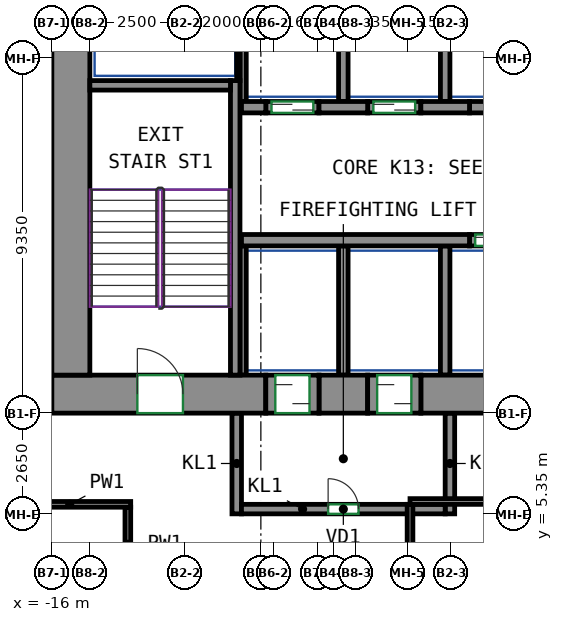
"""IFC4 building model, lengths in metres.
Left out: names, types, materials, properties, quantities, classifications, styles, units other than length and angle.
Written with IfcOpenShell. Run it as: python <this file> out.ifc"""

import sys

from ifc_helpers import new_model, si_unit, direction, frame, frame_2d, origin, place, context, subcontext, project, spatial, rectangle, extrude, source, transform, mapped, element, fill, save


model = new_model("IFC4")
c1 = context("Model", 3, precision=1e-05, world=origin(), true_north=direction((0.0, 1.0)))
c2 = subcontext(c1, "Body", "Model", "MODEL_VIEW")
j1 = project(units=[si_unit("LENGTHUNIT", "METRE"), si_unit("PLANEANGLEUNIT", "RADIAN")], contexts=[c1])
p1 = place(None, origin())
s1 = spatial("IfcSite", under=j1, at=p1, CompositionType="ELEMENT")
p2 = place(p1, origin())
s2 = spatial("IfcBuilding", under=s1, at=p2, CompositionType="ELEMENT")
p3 = place(p2, frame((0.0, 0.0, 55.0)))
s3 = spatial("IfcBuildingStorey", under=s2, at=p3, CompositionType="ELEMENT", Elevation=55.0)
m1 = source(origin(), c2, "Body", "SweptSolid", [
    extrude(rectangle(XDim=5.63, YDim=1.0, at=frame_2d((2.815, 0.0))), origin(), (0.0, 0.0, 1.0), 3.6),
])
p4 = place(p3, frame((-16.0, 8.5, 0.0), z_axis=(0.0, 0.0, 1.0), x_axis=(1.0, 0.0, 0.0)))
e1 = element("IfcWall", 1, at=p4, inside=s3, PredefinedType="SHEAR", context=c2, shape_type="MappedRepresentation", body=[
    mapped(m1, transform((0.0, 0.0, 0.0))),
])
p5 = place(p4, frame((2.25, 0.0, 0.0)))
e2 = element("IfcOpeningElement", 2, at=p5, cuts=e1, PredefinedType="OPENING", context=c2, shape_type="SweptSolid", body=[
    extrude(rectangle(XDim=1.2, YDim=2.1, at=frame_2d((0.6, 1.05))), frame((0.0, 0.51, 0.0), z_axis=(0.0, -1.0, 0.0), x_axis=(1.0, 0.0, 0.0)), (0.0, 0.0, 1.0), 1.02),
])
m2 = source(origin(), c2, "Body", "SweptSolid", [
    extrude(rectangle(XDim=1.28, YDim=1.0, at=frame_2d((0.64, 0.0))), origin(), (0.0, 0.0, 1.0), 3.6),
])
p6 = place(p3, frame((-8.97, 8.5, 0.0), z_axis=(0.0, 0.0, 1.0), x_axis=(1.0, 0.0, 0.0)))
e3 = element("IfcWall", 3, at=p6, inside=s3, PredefinedType="SHEAR", context=c2, shape_type="MappedRepresentation", body=[
    mapped(m2, transform((0.0, 0.0, 0.0))),
])
m3 = source(origin(), c2, "Body", "SweptSolid", [
    extrude(rectangle(XDim=14.18, YDim=1.0, at=frame_2d((7.09, 0.0))), origin(), (0.0, 0.0, 1.0), 3.6),
])
p7 = place(p3, frame((-6.29, 8.5, 0.0), z_axis=(0.0, 0.0, 1.0), x_axis=(1.0, 0.0, 0.0)))
e4 = element("IfcWall", 4, at=p7, inside=s3, PredefinedType="SHEAR", context=c2, shape_type="MappedRepresentation", body=[
    mapped(m3, transform((0.0, 0.0, 0.0))),
])
m4 = source(origin(), c2, "Body", "SweptSolid", [
    extrude(rectangle(XDim=12.0, YDim=1.0, at=frame_2d((6.0, 0.0))), origin(), (0.0, 0.0, 1.0), 3.6),
])
p8 = place(p3, frame((-15.5, 9.0, 0.0), z_axis=(0.0, 0.0, 1.0), x_axis=(0.0, 1.0, 0.0)))
e5 = element("IfcWall", 5, at=p8, inside=s3, PredefinedType="SHEAR", context=c2, shape_type="MappedRepresentation", body=[
    mapped(m4, transform((0.0, 0.0, 0.0))),
])
m5 = source(origin(), c2, "Body", "SweptSolid", [
    extrude(rectangle(XDim=7.75, YDim=0.25, at=frame_2d((3.875, 0.0))), origin(), (0.0, 0.0, 1.0), 3.6),
])
p9 = place(p3, frame((-11.175, 9.0, 0.0), z_axis=(0.0, 0.0, 1.0), x_axis=(0.0, 1.0, 0.0)))
e6 = element("IfcWall", 6, at=p9, inside=s3, PredefinedType="SHEAR", context=c2, shape_type="MappedRepresentation", body=[
    mapped(m5, transform((0.0, 0.0, 0.0))),
])
m6 = source(origin(), c2, "Body", "SweptSolid", [
    extrude(rectangle(XDim=3.7, YDim=0.25, at=frame_2d((1.85, 0.0))), origin(), (0.0, 0.0, 1.0), 3.6),
])
p10 = place(p3, frame((-15.0, 16.625, 0.0), z_axis=(0.0, 0.0, 1.0), x_axis=(1.0, 0.0, 0.0)))
e7 = element("IfcWall", 7, at=p10, inside=s3, PredefinedType="SHEAR", context=c2, shape_type="MappedRepresentation", body=[
    mapped(m6, transform((0.0, 0.0, 0.0))),
])
m7 = source(origin(), c2, "Body", "SweptSolid", [
    extrude(rectangle(XDim=6.0, YDim=0.3, at=frame_2d((3.0, 0.0))), origin(), (0.0, 0.0, 1.0), 3.6),
])
p11 = place(p3, frame((-11.01, 12.55, 0.0), z_axis=(0.0, 0.0, 1.0), x_axis=(1.0, 0.0, 0.0)))
e8 = element("IfcWall", 8, at=p11, inside=s3, PredefinedType="SHEAR", context=c2, shape_type="MappedRepresentation", body=[
    mapped(m7, transform((0.0, 0.0, 0.0))),
])
m8 = source(origin(), c2, "Body", "SweptSolid", [
    extrude(rectangle(XDim=0.64, YDim=0.3, at=frame_2d((0.32, 0.0))), origin(), (0.0, 0.0, 1.0), 3.6),
])
p12 = place(p3, frame((-11.01, 16.05, 0.0), z_axis=(0.0, 0.0, 1.0), x_axis=(1.0, 0.0, 0.0)))
e9 = element("IfcWall", 9, at=p12, inside=s3, PredefinedType="SHEAR", context=c2, shape_type="MappedRepresentation", body=[
    mapped(m8, transform((0.0, 0.0, 0.0))),
])
m9 = source(origin(), c2, "Body", "SweptSolid", [
    extrude(rectangle(XDim=1.28, YDim=0.3, at=frame_2d((0.64, 0.0))), origin(), (0.0, 0.0, 1.0), 3.6),
])
for number, where, z_axis, x_axis in (
    (10, (-8.97, 16.05, 0.0), (0.0, 0.0, 1.0), (1.0, 0.0, 0.0)),
    (11, (-6.29, 16.05, 0.0), (0.0, 0.0, 1.0), (1.0, 0.0, 0.0)),
):
    element("IfcWall", number, at=place(p3, frame(where, z_axis=z_axis, x_axis=x_axis)), inside=s3, PredefinedType="SHEAR", context=c2, shape_type="MappedRepresentation", body=[
        mapped(m9, transform((0.0, 0.0, 0.0))),
    ])
m10 = source(origin(), c2, "Body", "SweptSolid", [
    extrude(rectangle(XDim=1.4, YDim=0.3, at=frame_2d((0.7, 0.0))), origin(), (0.0, 0.0, 1.0), 3.6),
])
p13 = place(p3, frame((-5.01, 12.55, 0.0), z_axis=(0.0, 0.0, 1.0), x_axis=(1.0, 0.0, 0.0)))
e12 = element("IfcWall", 12, at=p13, inside=s3, PredefinedType="PARTITIONING", context=c2, shape_type="MappedRepresentation", body=[
    mapped(m10, transform((0.0, 0.0, 0.0))),
])
p14 = place(p13, frame((0.15, 0.0, 0.0)))
e13 = element("IfcOpeningElement", 13, at=p14, cuts=e12, PredefinedType="OPENING", context=c2, shape_type="SweptSolid", body=[
    extrude(rectangle(XDim=1.1, YDim=2.1, at=frame_2d((0.55, 1.05))), frame((0.0, 0.16, 0.0), z_axis=(0.0, -1.0, 0.0), x_axis=(1.0, 0.0, 0.0)), (0.0, 0.0, 1.0), 0.32),
])
m11 = source(origin(), c2, "Body", "SweptSolid", [
    extrude(rectangle(XDim=1.4, YDim=0.3, at=frame_2d((0.7, 0.0))), origin(), (0.0, 0.0, 1.0), 3.6),
])
p15 = place(p3, frame((-10.37, 16.05, 0.0), z_axis=(0.0, 0.0, 1.0), x_axis=(1.0, 0.0, 0.0)))
e14 = element("IfcWall", 14, at=p15, inside=s3, PredefinedType="PARTITIONING", context=c2, shape_type="MappedRepresentation", body=[
    mapped(m11, transform((0.0, 0.0, 0.0))),
])
p16 = place(p15, frame((0.15, 0.0, 0.0)))
e15 = element("IfcOpeningElement", 15, at=p16, cuts=e14, PredefinedType="OPENING", context=c2, shape_type="SweptSolid", body=[
    extrude(rectangle(XDim=1.1, YDim=2.1, at=frame_2d((0.55, 1.05))), frame((0.0, 0.16, 0.0), z_axis=(0.0, -1.0, 0.0), x_axis=(1.0, 0.0, 0.0)), (0.0, 0.0, 1.0), 0.32),
])
p17 = place(p3, frame((-7.69, 16.05, 0.0), z_axis=(0.0, 0.0, 1.0), x_axis=(1.0, 0.0, 0.0)))
e16 = element("IfcWall", 16, at=p17, inside=s3, PredefinedType="PARTITIONING", context=c2, shape_type="MappedRepresentation", body=[
    mapped(m10, transform((0.0, 0.0, 0.0))),
])
p18 = place(p17, frame((0.15, 0.0, 0.0)))
e17 = element("IfcOpeningElement", 17, at=p18, cuts=e16, PredefinedType="OPENING", context=c2, shape_type="SweptSolid", body=[
    extrude(rectangle(XDim=1.1, YDim=2.1, at=frame_2d((0.55, 1.05))), frame((0.0, 0.16, 0.0), z_axis=(0.0, -1.0, 0.0), x_axis=(1.0, 0.0, 0.0)), (0.0, 0.0, 1.0), 0.32),
])
p19 = place(p3, frame((-5.01, 16.05, 0.0), z_axis=(0.0, 0.0, 1.0), x_axis=(1.0, 0.0, 0.0)))
e18 = element("IfcWall", 18, at=p19, inside=s3, PredefinedType="PARTITIONING", context=c2, shape_type="MappedRepresentation", body=[
    mapped(m10, transform((0.0, 0.0, 0.0))),
])
m12 = source(origin(), c2, "Body", "SweptSolid", [
    extrude(rectangle(XDim=2.65, YDim=0.25, at=frame_2d((1.325, 0.0))), origin(), (0.0, 0.0, 1.0), 3.6),
])
for number, where, z_axis, x_axis in (
    (19, (-11.135, 5.35, 0.0), (0.0, 0.0, 1.0), (0.0, 1.0, 0.0)),
    (20, (-5.525, 5.35, 0.0), (0.0, 0.0, 1.0), (0.0, 1.0, 0.0)),
):
    element("IfcWall", number, at=place(p3, frame(where, z_axis=z_axis, x_axis=x_axis)), inside=s3, PredefinedType="PARTITIONING", context=c2, shape_type="MappedRepresentation", body=[
        mapped(m12, transform((0.0, 0.0, 0.0))),
    ])
m13 = source(origin(), c2, "Body", "SweptSolid", [
    extrude(rectangle(XDim=5.36, YDim=0.25, at=frame_2d((2.68, 0.0))), origin(), (0.0, 0.0, 1.0), 3.6),
])
p20 = place(p3, frame((-11.01, 5.475, 0.0), z_axis=(0.0, 0.0, 1.0), x_axis=(1.0, 0.0, 0.0)))
e21 = element("IfcWall", 21, at=p20, inside=s3, PredefinedType="PARTITIONING", context=c2, shape_type="MappedRepresentation", body=[
    mapped(m13, transform((0.0, 0.0, 0.0))),
])
p21 = place(p20, frame((2.28, 0.0, 0.0)))
e22 = element("IfcOpeningElement", 22, at=p21, cuts=e21, PredefinedType="OPENING", context=c2, shape_type="SweptSolid", body=[
    extrude(rectangle(XDim=0.8, YDim=2.0, at=frame_2d((0.4, 1.0))), frame((0.0, 0.135, 0.0), z_axis=(0.0, -1.0, 0.0), x_axis=(1.0, 0.0, 0.0)), (0.0, 0.0, 1.0), 0.27),
])
m14 = source(origin(), c2, "Body", "SweptSolid", [
    extrude(rectangle(XDim=3.275, YDim=0.165, at=frame_2d((1.638, 0.0))), origin(), (0.0, 0.0, 1.0), 3.6),
])
p22 = place(p3, frame((-10.968, 16.2, 0.0), z_axis=(0.0, 0.0, 1.0), x_axis=(0.0, 1.0, 0.0)))
e23 = element("IfcWall", 23, at=p22, inside=s3, PredefinedType="PARTITIONING", context=c2, shape_type="MappedRepresentation", body=[
    mapped(m14, transform((0.0, 0.0, 0.0))),
])
m15 = source(origin(), c2, "Body", "SweptSolid", [
    extrude(rectangle(XDim=2.725, YDim=0.085, at=frame_2d((1.363, 0.0))), origin(), (0.0, 0.0, 1.0), 3.6),
])
p23 = place(p3, frame((-11.093, 16.75, 0.0), z_axis=(0.0, 0.0, 1.0), x_axis=(0.0, 1.0, 0.0)))
e24 = element("IfcWall", 24, at=p23, inside=s3, PredefinedType="PARTITIONING", context=c2, shape_type="MappedRepresentation", body=[
    mapped(m15, transform((0.0, 0.0, 0.0))),
])
m16 = source(origin(), c2, "Body", "SweptSolid", [
    extrude(rectangle(XDim=3.275, YDim=0.25, at=frame_2d((1.638, 0.0))), origin(), (0.0, 0.0, 1.0), 3.6),
])
for number, where, z_axis, x_axis in (
    (25, (-5.65, 16.2, 0.0), (0.0, 0.0, 1.0), (0.0, 1.0, 0.0)),
    (26, (-8.33, 16.2, 0.0), (0.0, 0.0, 1.0), (0.0, 1.0, 0.0)),
):
    element("IfcWall", number, at=place(p3, frame(where, z_axis=z_axis, x_axis=x_axis)), inside=s3, PredefinedType="PARTITIONING", context=c2, shape_type="MappedRepresentation", body=[
        mapped(m16, transform((0.0, 0.0, 0.0))),
    ])
m17 = source(origin(), c2, "Body", "SweptSolid", [
    extrude(rectangle(XDim=3.4, YDim=0.165, at=frame_2d((1.7, 0.0))), origin(), (0.0, 0.0, 1.0), 3.6),
])
p24 = place(p3, frame((-10.968, 9.0, 0.0), z_axis=(0.0, 0.0, 1.0), x_axis=(0.0, 1.0, 0.0)))
e27 = element("IfcWall", 27, at=p24, inside=s3, PredefinedType="PARTITIONING", context=c2, shape_type="MappedRepresentation", body=[
    mapped(m17, transform((0.0, 0.0, 0.0))),
])
m18 = source(origin(), c2, "Body", "SweptSolid", [
    extrude(rectangle(XDim=3.4, YDim=0.25, at=frame_2d((1.7, 0.0))), origin(), (0.0, 0.0, 1.0), 3.6),
])
for number, where, z_axis, x_axis in (
    (28, (-5.65, 9.0, 0.0), (0.0, 0.0, 1.0), (0.0, 1.0, 0.0)),
    (29, (-8.33, 9.0, 0.0), (0.0, 0.0, 1.0), (0.0, 1.0, 0.0)),
):
    element("IfcWall", number, at=place(p3, frame(where, z_axis=z_axis, x_axis=x_axis)), inside=s3, PredefinedType="PARTITIONING", context=c2, shape_type="MappedRepresentation", body=[
        mapped(m18, transform((0.0, 0.0, 0.0))),
    ])
m19 = source(origin(), c2, "Body", "SweptSolid", [
    extrude(rectangle(XDim=1.4, YDim=1.0, at=frame_2d((0.7, 0.0))), origin(), (0.0, 0.0, 1.0), 2.7),
])
p25 = place(p3, frame((-10.37, 8.5, 0.0), z_axis=(0.0, 0.0, 1.0), x_axis=(1.0, 0.0, 0.0)))
e30 = element("IfcWall", 30, at=p25, inside=s3, PredefinedType="PARTITIONING", context=c2, shape_type="MappedRepresentation", body=[
    mapped(m19, transform((0.0, 0.0, 0.0))),
])
p26 = place(p25, frame((0.25, 0.0, 0.0)))
e31 = element("IfcOpeningElement", 31, at=p26, cuts=e30, PredefinedType="OPENING", context=c2, shape_type="SweptSolid", body=[
    extrude(rectangle(XDim=0.9, YDim=2.1, at=frame_2d((0.45, 1.05))), frame((0.0, 0.51, 0.0), z_axis=(0.0, -1.0, 0.0), x_axis=(1.0, 0.0, 0.0)), (0.0, 0.0, 1.0), 1.02),
])
m20 = source(origin(), c2, "Body", "SweptSolid", [
    extrude(rectangle(XDim=1.4, YDim=1.0, at=frame_2d((0.7, 0.0))), origin(), (0.0, 0.0, 1.0), 2.7),
])
p27 = place(p3, frame((-7.69, 8.5, 0.0), z_axis=(0.0, 0.0, 1.0), x_axis=(1.0, 0.0, 0.0)))
e32 = element("IfcWall", 32, at=p27, inside=s3, PredefinedType="PARTITIONING", context=c2, shape_type="MappedRepresentation", body=[
    mapped(m20, transform((0.0, 0.0, 0.0))),
])
p28 = place(p27, frame((0.25, 0.0, 0.0)))
e33 = element("IfcOpeningElement", 33, at=p28, cuts=e32, PredefinedType="OPENING", context=c2, shape_type="SweptSolid", body=[
    extrude(rectangle(XDim=0.9, YDim=2.1, at=frame_2d((0.45, 1.05))), frame((0.0, 0.51, 0.0), z_axis=(0.0, -1.0, 0.0), x_axis=(1.0, 0.0, 0.0)), (0.0, 0.0, 1.0), 1.02),
])
p29 = place(p3, frame((-14.0, 5.525, 0.0), z_axis=(0.0, 0.0, 1.0), x_axis=(0.0, -1.0, 0.0)))
e34 = element("IfcWall", 34, at=p29, inside=s3, PredefinedType="PARTITIONING", context=c2, shape_type="SweptSolid", body=[
    extrude(rectangle(XDim=1.95, YDim=0.15, at=frame_2d((0.975, 0.0))), origin(), (0.0, 0.0, 1.0), 3.6),
])
p30 = place(p3, frame((-19.275, 5.6, 0.0), z_axis=(0.0, 0.0, 1.0), x_axis=(1.0, 0.0, 0.0)))
e35 = element("IfcWall", 35, at=p30, inside=s3, PredefinedType="PARTITIONING", context=c2, shape_type="SweptSolid", body=[
    extrude(rectangle(XDim=5.35, YDim=0.15, at=frame_2d((2.675, 0.0))), origin(), (0.0, 0.0, 1.0), 3.6),
])
p31 = place(p30, frame((1.517, 0.0, 0.0)))
e36 = element("IfcOpeningElement", 36, at=p31, cuts=e35, PredefinedType="OPENING", context=c2, shape_type="SweptSolid", body=[
    extrude(rectangle(XDim=1.0, YDim=2.1, at=frame_2d((0.5, 1.05))), frame((0.0, 0.085, 0.0), z_axis=(0.0, -1.0, 0.0), x_axis=(1.0, 0.0, 0.0)), (0.0, 0.0, 1.0), 0.17),
])
p32 = place(p3, frame((-6.575, -9.4, 0.0), z_axis=(0.0, 0.0, 1.0), x_axis=(0.0, 1.0, 0.0)))
e37 = element("IfcWall", 37, at=p32, inside=s3, PredefinedType="PARTITIONING", context=c2, shape_type="SweptSolid", body=[
    extrude(rectangle(XDim=15.0, YDim=0.15, at=frame_2d((7.5, 0.0))), origin(), (0.0, 0.0, 1.0), 3.6),
])
p33 = place(p3, frame((-6.575, 5.675, 0.0), z_axis=(0.0, 0.0, 1.0), x_axis=(1.0, 0.0, 0.0)))
e38 = element("IfcWall", 38, at=p33, inside=s3, PredefinedType="PARTITIONING", context=c2, shape_type="SweptSolid", body=[
    extrude(rectangle(XDim=15.075, YDim=0.15, at=frame_2d((7.538, 0.0))), origin(), (0.0, 0.0, 1.0), 3.6),
])
p34 = place(p21, origin())
e39 = element("IfcDoor", 39, at=p34, inside=s3, OperationType="SINGLE_SWING_LEFT", PredefinedType="DOOR", context=c2, shape_type="SweptSolid", body=[
    extrude(rectangle(XDim=0.8, YDim=2.0, at=frame_2d((0.4, 1.0))), frame((0.0, 0.025, 0.0), z_axis=(0.0, -1.0, 0.0), x_axis=(1.0, 0.0, 0.0)), (0.0, 0.0, 1.0), 0.05),
])
fill(e22, e39)
p35 = place(p26, origin())
e40 = element("IfcDoor", 40, at=p35, inside=s3, OperationType="SLIDING_TO_LEFT", PredefinedType="DOOR", context=c2, shape_type="SweptSolid", body=[
    extrude(rectangle(XDim=0.9, YDim=2.1, at=frame_2d((0.45, 1.05))), frame((0.0, 0.405, 0.0), z_axis=(0.0, -1.0, 0.0), x_axis=(1.0, 0.0, 0.0)), (0.0, 0.0, 1.0), 0.05),
])
fill(e31, e40)
p36 = place(p28, origin())
e41 = element("IfcDoor", 41, at=p36, inside=s3, OperationType="SLIDING_TO_RIGHT", PredefinedType="DOOR", context=c2, shape_type="SweptSolid", body=[
    extrude(rectangle(XDim=0.9, YDim=2.1, at=frame_2d((0.45, 1.05))), frame((0.0, 0.405, 0.0), z_axis=(0.0, -1.0, 0.0), x_axis=(1.0, 0.0, 0.0)), (0.0, 0.0, 1.0), 0.05),
])
fill(e33, e41)
p37 = place(p14, origin())
e42 = element("IfcDoor", 42, at=p37, inside=s3, OperationType="DOUBLE_DOOR_SLIDING", PredefinedType="DOOR", context=c2, shape_type="SweptSolid", body=[
    extrude(rectangle(XDim=1.1, YDim=2.1, at=frame_2d((0.55, 1.05))), frame((0.0, 0.025, 0.0), z_axis=(0.0, -1.0, 0.0), x_axis=(1.0, 0.0, 0.0)), (0.0, 0.0, 1.0), 0.05),
])
fill(e13, e42)
p38 = place(p16, origin())
e43 = element("IfcDoor", 43, at=p38, inside=s3, OperationType="DOUBLE_DOOR_SLIDING", PredefinedType="DOOR", context=c2, shape_type="SweptSolid", body=[
    extrude(rectangle(XDim=1.1, YDim=2.1, at=frame_2d((0.55, 1.05))), frame((0.0, 0.025, 0.0), z_axis=(0.0, -1.0, 0.0), x_axis=(1.0, 0.0, 0.0)), (0.0, 0.0, 1.0), 0.05),
])
fill(e15, e43)
p39 = place(p18, origin())
e44 = element("IfcDoor", 44, at=p39, inside=s3, OperationType="DOUBLE_DOOR_SLIDING", PredefinedType="DOOR", context=c2, shape_type="SweptSolid", body=[
    extrude(rectangle(XDim=1.1, YDim=2.1, at=frame_2d((0.55, 1.05))), frame((0.0, 0.025, 0.0), z_axis=(0.0, -1.0, 0.0), x_axis=(1.0, 0.0, 0.0)), (0.0, 0.0, 1.0), 0.05),
])
fill(e17, e44)
p40 = place(p5, origin())
e45 = element("IfcDoor", 45, at=p40, inside=s3, OperationType="DOUBLE_DOOR_SINGLE_SWING", PredefinedType="DOOR", context=c2, shape_type="SweptSolid", body=[
    extrude(rectangle(XDim=1.2, YDim=2.1, at=frame_2d((0.6, 1.05))), frame((0.0, 0.405, 0.0), z_axis=(0.0, -1.0, 0.0), x_axis=(1.0, 0.0, 0.0)), (0.0, 0.0, 1.0), 0.05),
])
fill(e2, e45)
save(model, sys.argv[1])
